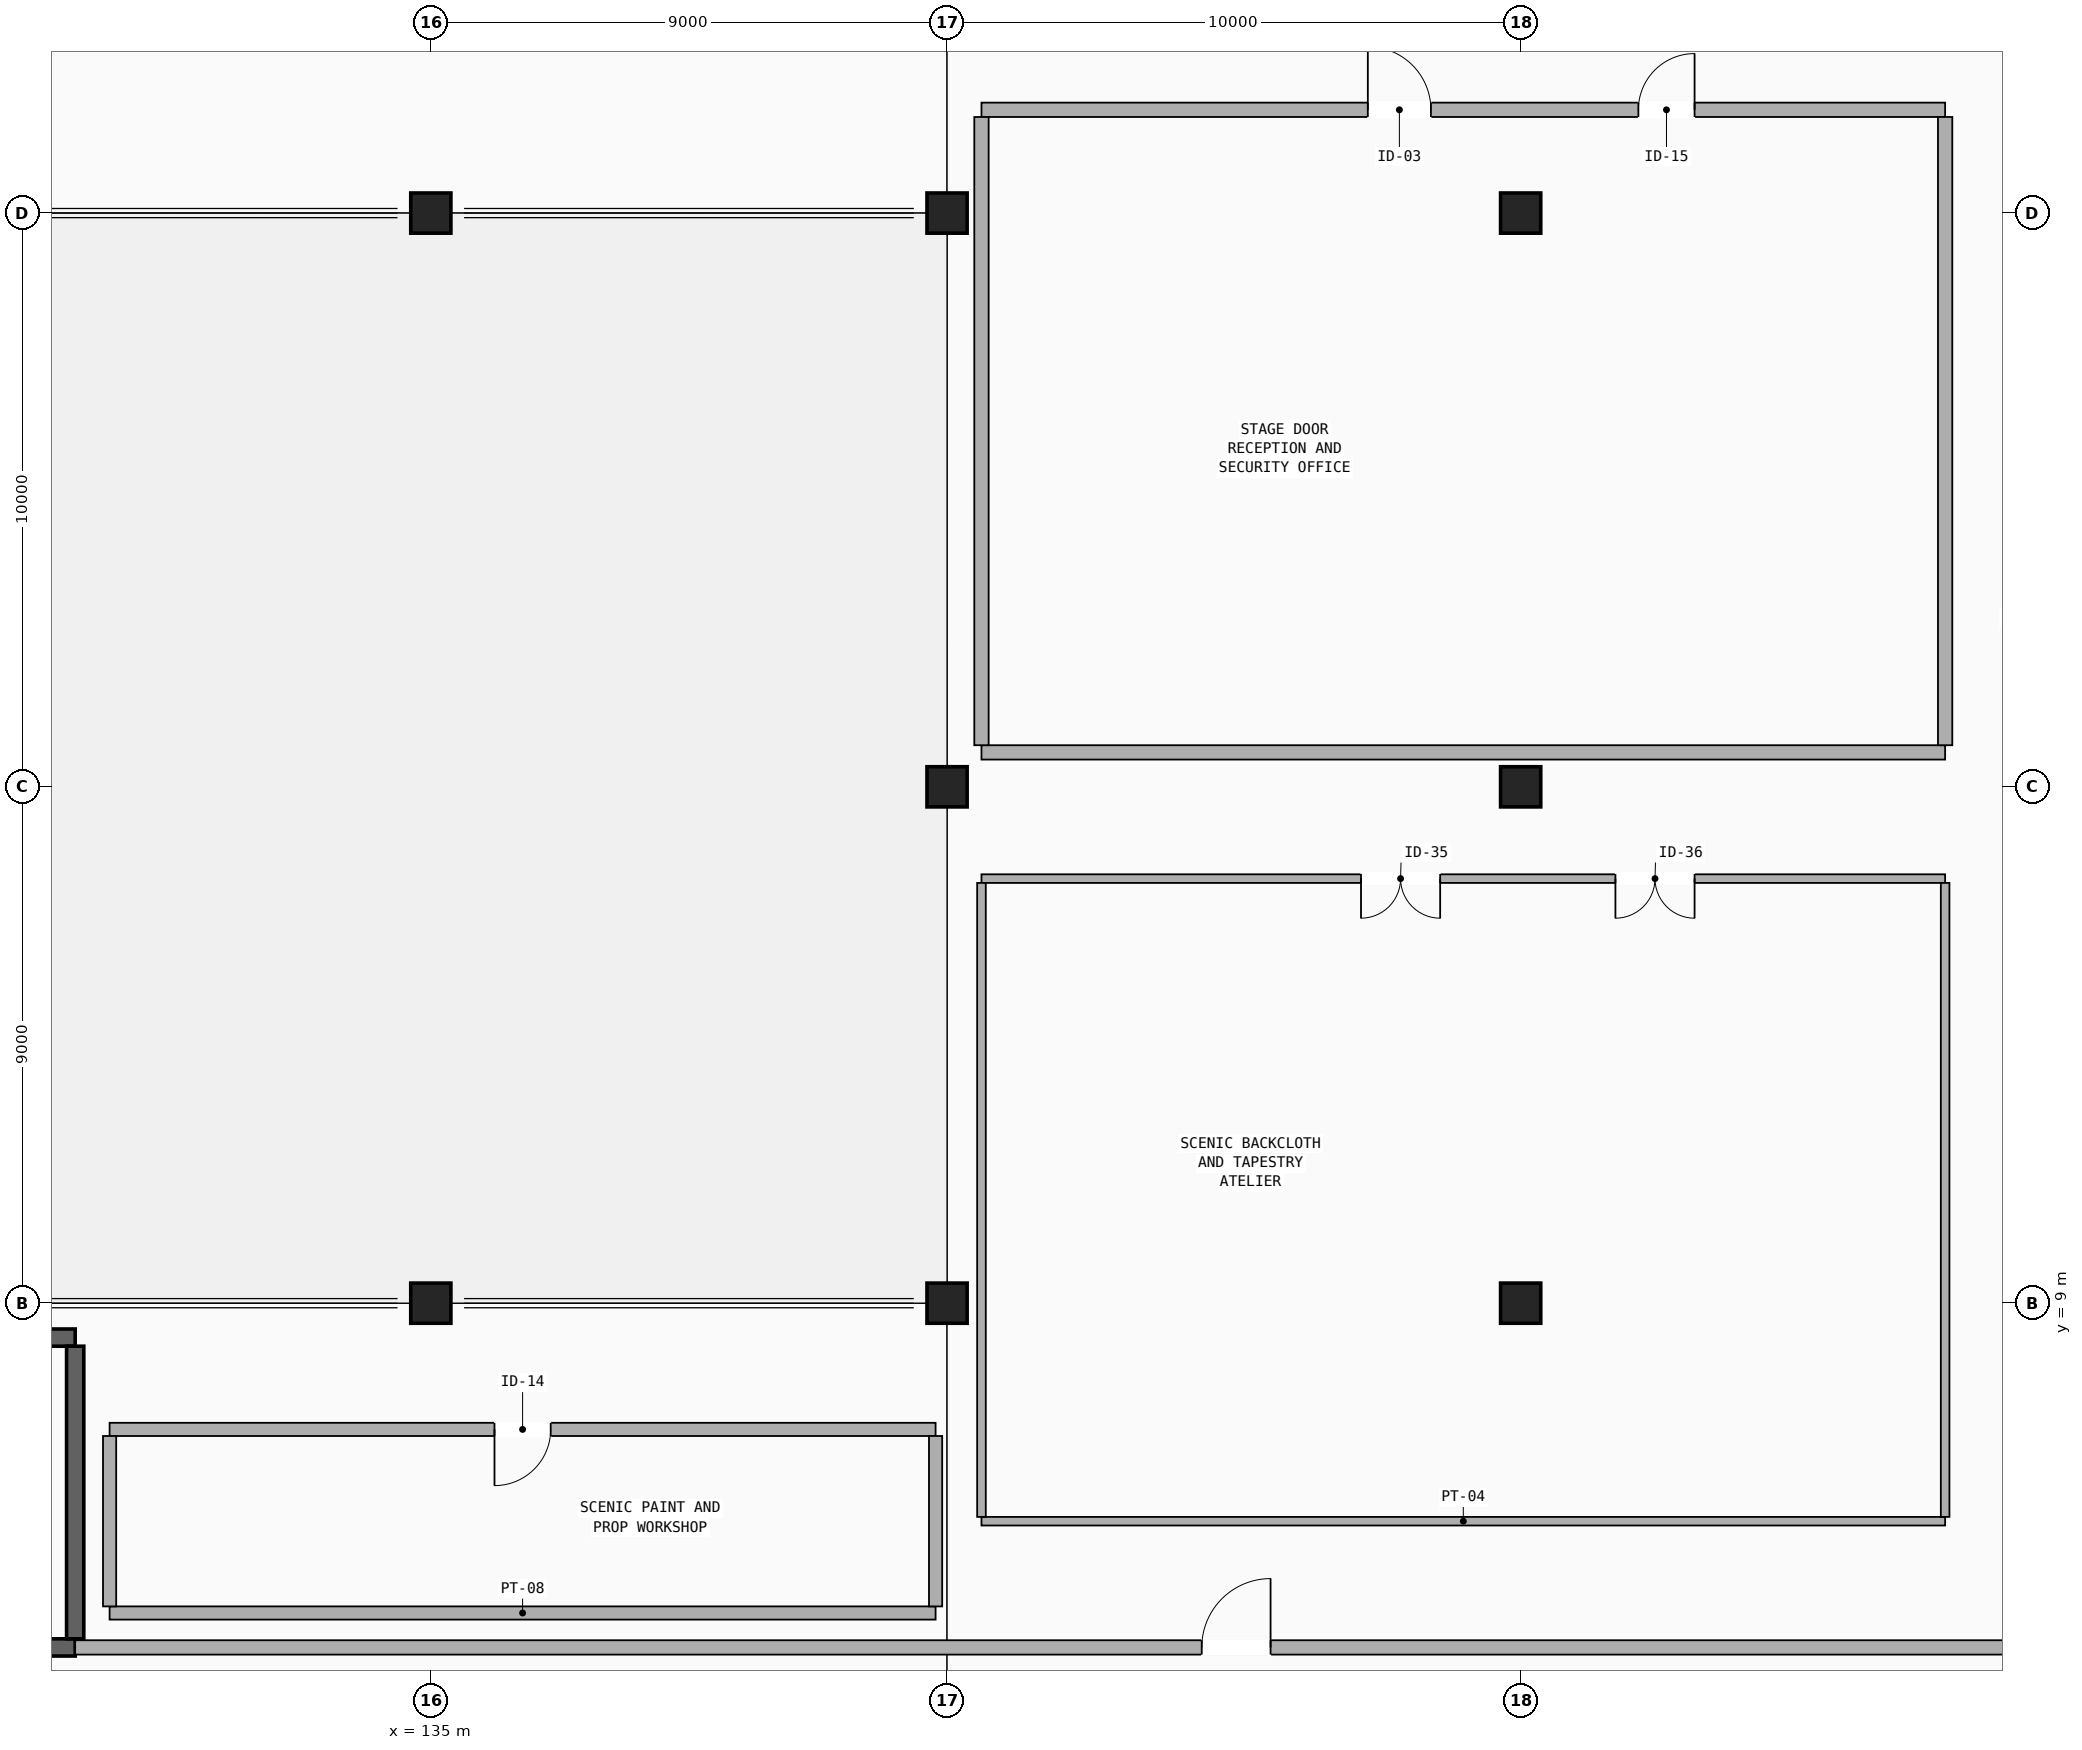
"""IFC4 building model, lengths in metres.
Left out: names, types, materials, properties, quantities, classifications, styles, units other than length and angle.
Written with IfcOpenShell. Run it as: python <this file> out.ifc"""

import sys

from ifc_helpers import new_model, si_unit, direction, frame, frame_2d, origin, origin_2d, place, context, subcontext, project, spatial, rectangle, extrude, element, fill, save


model = new_model("IFC4")
c1 = context("Model", 3, precision=1e-05, world=origin(), true_north=direction((0.0, 1.0)))
c2 = subcontext(c1, "Body", "Model", "MODEL_VIEW")
j1 = project(units=[si_unit("LENGTHUNIT", "METRE"), si_unit("PLANEANGLEUNIT", "RADIAN")], contexts=[c1])
p1 = place(None, origin())
s1 = spatial("IfcSite", under=j1, at=p1, CompositionType="ELEMENT")
p2 = place(p1, origin())
s2 = spatial("IfcBuilding", under=s1, at=p2, CompositionType="ELEMENT")
p3 = place(p2, origin())
s3 = spatial("IfcBuildingStorey", under=s2, at=p3, CompositionType="ELEMENT", Elevation=0.0)
for number, where, z_axis, x_axis in (
    (1, (135.0, 9.0, 0.0), (0.0, 0.0, 1.0), (1.0, 0.0, 0.0)),
    (2, (135.0, 28.0, 0.0), (0.0, 0.0, 1.0), (1.0, 0.0, 0.0)),
    (3, (144.0, 9.0, 0.0), (0.0, 0.0, 1.0), (1.0, 0.0, 0.0)),
    (4, (144.0, 18.0, 0.0), (0.0, 0.0, 1.0), (1.0, 0.0, 0.0)),
    (5, (144.0, 28.0, 0.0), (0.0, 0.0, 1.0), (1.0, 0.0, 0.0)),
    (6, (154.0, 9.0, 0.0), (0.0, 0.0, 1.0), (1.0, 0.0, 0.0)),
    (7, (154.0, 18.0, 0.0), (0.0, 0.0, 1.0), (1.0, 0.0, 0.0)),
    (8, (154.0, 28.0, 0.0), (0.0, 0.0, 1.0), (1.0, 0.0, 0.0)),
):
    element("IfcColumn", number, at=place(p3, frame(where, z_axis=z_axis, x_axis=x_axis)), inside=s3, PredefinedType="COLUMN", context=c2, shape_type="SweptSolid", body=[
        extrude(rectangle(XDim=0.7, YDim=0.7, at=origin_2d()), origin(), (0.0, 0.0, 1.0), 5.1),
    ])
p4 = place(p3, frame((118.5, 3.0, 0.0), z_axis=(0.0, 0.0, 1.0), x_axis=(1.0, 0.0, 0.0)))
e9 = element("IfcWall", 9, at=p4, inside=s3, PredefinedType="SHEAR", context=c2, shape_type="SweptSolid", body=[
    extrude(rectangle(XDim=10.3, YDim=0.3, at=frame_2d((5.15, 0.0))), origin(), (0.0, 0.0, 1.0), 5.1),
])
p5 = place(p4, frame((0.45, 0.0, 0.0)))
e10 = element("IfcOpeningElement", 10, at=p5, cuts=e9, PredefinedType="OPENING", context=c2, shape_type="SweptSolid", body=[
    extrude(rectangle(XDim=1.1, YDim=2.2, at=frame_2d((0.55, 1.1))), frame((0.0, 0.16, 0.0), z_axis=(0.0, -1.0, 0.0), x_axis=(1.0, 0.0, 0.0)), (0.0, 0.0, 1.0), 0.32),
])
p6 = place(p3, frame((118.5, 8.4, 0.0), z_axis=(0.0, 0.0, 1.0), x_axis=(1.0, 0.0, 0.0)))
e11 = element("IfcWall", 11, at=p6, inside=s3, PredefinedType="SHEAR", context=c2, shape_type="SweptSolid", body=[
    extrude(rectangle(XDim=10.3, YDim=0.3, at=frame_2d((5.15, 0.0))), origin(), (0.0, 0.0, 1.0), 5.1),
])
p7 = place(p3, frame((128.8, 3.15, 0.0), z_axis=(0.0, 0.0, 1.0), x_axis=(0.0, 1.0, 0.0)))
e12 = element("IfcWall", 12, at=p7, inside=s3, PredefinedType="SHEAR", context=c2, shape_type="SweptSolid", body=[
    extrude(rectangle(XDim=5.1, YDim=0.3, at=frame_2d((2.55, 0.0))), origin(), (0.0, 0.0, 1.0), 5.1),
])
p8 = place(p3, frame((129.4, 3.6, 0.0), z_axis=(0.0, 0.0, 1.0), x_axis=(1.0, 0.0, 0.0)))
e13 = element("IfcWall", 13, at=p8, inside=s3, PredefinedType="PARTITIONING", context=c2, shape_type="SweptSolid", body=[
    extrude(rectangle(XDim=14.4, YDim=0.23, at=frame_2d((7.2, 0.0))), origin(), (0.0, 0.0, 1.0), 4.15),
])
p9 = place(p3, frame((129.4, 6.8, 0.0), z_axis=(0.0, 0.0, 1.0), x_axis=(1.0, 0.0, 0.0)))
e14 = element("IfcWall", 14, at=p9, inside=s3, PredefinedType="PARTITIONING", context=c2, shape_type="SweptSolid", body=[
    extrude(rectangle(XDim=14.4, YDim=0.23, at=frame_2d((7.2, 0.0))), origin(), (0.0, 0.0, 1.0), 4.15),
])
p10 = place(p9, frame((6.71, 0.0, 0.0)))
e15 = element("IfcOpeningElement", 15, at=p10, cuts=e14, PredefinedType="OPENING", context=c2, shape_type="SweptSolid", body=[
    extrude(rectangle(XDim=0.98, YDim=2.14, at=frame_2d((0.49, 1.07))), frame((0.0, 0.125, 0.0), z_axis=(0.0, -1.0, 0.0), x_axis=(1.0, 0.0, 0.0)), (0.0, 0.0, 1.0), 0.25),
])
p11 = place(p3, frame((129.4, 3.715, 0.0), z_axis=(0.0, 0.0, 1.0), x_axis=(0.0, 1.0, 0.0)))
e16 = element("IfcWall", 16, at=p11, inside=s3, PredefinedType="PARTITIONING", context=c2, shape_type="SweptSolid", body=[
    extrude(rectangle(XDim=2.97, YDim=0.23, at=frame_2d((1.485, 0.0))), origin(), (0.0, 0.0, 1.0), 4.85),
])
p12 = place(p3, frame((143.8, 3.715, 0.0), z_axis=(0.0, 0.0, 1.0), x_axis=(0.0, 1.0, 0.0)))
e17 = element("IfcWall", 17, at=p12, inside=s3, PredefinedType="PARTITIONING", context=c2, shape_type="SweptSolid", body=[
    extrude(rectangle(XDim=2.97, YDim=0.23, at=frame_2d((1.485, 0.0))), origin(), (0.0, 0.0, 1.0), 4.15),
])
p13 = place(p3, frame((144.6, 18.6, 0.0), z_axis=(0.0, 0.0, 1.0), x_axis=(1.0, 0.0, 0.0)))
e18 = element("IfcWall", 18, at=p13, inside=s3, PredefinedType="PARTITIONING", context=c2, shape_type="SweptSolid", body=[
    extrude(rectangle(XDim=16.8, YDim=0.25, at=frame_2d((8.4, 0.0))), origin(), (0.0, 0.0, 1.0), 3.98),
])
p14 = place(p3, frame((144.6, 29.8, 0.0), z_axis=(0.0, 0.0, 1.0), x_axis=(1.0, 0.0, 0.0)))
e19 = element("IfcWall", 19, at=p14, inside=s3, PredefinedType="PARTITIONING", context=c2, shape_type="SweptSolid", body=[
    extrude(rectangle(XDim=16.8, YDim=0.25, at=frame_2d((8.4, 0.0))), origin(), (0.0, 0.0, 1.0), 4.13),
])
p15 = place(p14, frame((6.736, 0.0, 0.0)))
e20 = element("IfcOpeningElement", 20, at=p15, cuts=e19, PredefinedType="OPENING", context=c2, shape_type="SweptSolid", body=[
    extrude(rectangle(XDim=1.1, YDim=2.2, at=frame_2d((0.55, 1.1))), frame((0.0, 0.135, 0.0), z_axis=(0.0, -1.0, 0.0), x_axis=(1.0, 0.0, 0.0)), (0.0, 0.0, 1.0), 0.27),
])
p16 = place(p14, frame((11.452, 0.0, 0.0)))
e21 = element("IfcOpeningElement", 21, at=p16, cuts=e19, PredefinedType="OPENING", context=c2, shape_type="SweptSolid", body=[
    extrude(rectangle(XDim=0.98, YDim=2.22, at=frame_2d((0.49, 1.11))), frame((0.0, 0.135, 0.0), z_axis=(0.0, -1.0, 0.0), x_axis=(1.0, 0.0, 0.0)), (0.0, 0.0, 1.0), 0.27),
])
p17 = place(p3, frame((144.6, 18.725, 0.0), z_axis=(0.0, 0.0, 1.0), x_axis=(0.0, 1.0, 0.0)))
e22 = element("IfcWall", 22, at=p17, inside=s3, PredefinedType="PARTITIONING", context=c2, shape_type="SweptSolid", body=[
    extrude(rectangle(XDim=10.95, YDim=0.25, at=frame_2d((5.475, 0.0))), origin(), (0.0, 0.0, 1.0), 3.98),
])
p18 = place(p3, frame((161.4, 18.725, 0.0), z_axis=(0.0, 0.0, 1.0), x_axis=(0.0, 1.0, 0.0)))
e23 = element("IfcWall", 23, at=p18, inside=s3, PredefinedType="PARTITIONING", context=c2, shape_type="SweptSolid", body=[
    extrude(rectangle(XDim=10.95, YDim=0.25, at=frame_2d((5.475, 0.0))), origin(), (0.0, 0.0, 1.0), 3.93),
])
p19 = place(p3, frame((144.6, 5.2, 0.0), z_axis=(0.0, 0.0, 1.0), x_axis=(1.0, 0.0, 0.0)))
e24 = element("IfcWall", 24, at=p19, inside=s3, PredefinedType="PARTITIONING", context=c2, shape_type="SweptSolid", body=[
    extrude(rectangle(XDim=16.8, YDim=0.15, at=frame_2d((8.4, 0.0))), origin(), (0.0, 0.0, 1.0), 4.15),
])
p20 = place(p3, frame((144.6, 16.4, 0.0), z_axis=(0.0, 0.0, 1.0), x_axis=(1.0, 0.0, 0.0)))
e25 = element("IfcWall", 25, at=p20, inside=s3, PredefinedType="PARTITIONING", context=c2, shape_type="SweptSolid", body=[
    extrude(rectangle(XDim=16.8, YDim=0.15, at=frame_2d((8.4, 0.0))), origin(), (0.0, 0.0, 1.0), 4.18),
])
p21 = place(p20, frame((6.616, 0.0, 0.0)))
e26 = element("IfcOpeningElement", 26, at=p21, cuts=e25, PredefinedType="OPENING", context=c2, shape_type="SweptSolid", body=[
    extrude(rectangle(XDim=1.38, YDim=2.14, at=frame_2d((0.69, 1.07))), frame((0.0, 0.085, 0.0), z_axis=(0.0, -1.0, 0.0), x_axis=(1.0, 0.0, 0.0)), (0.0, 0.0, 1.0), 0.17),
])
p22 = place(p20, frame((11.052, 0.0, 0.0)))
e27 = element("IfcOpeningElement", 27, at=p22, cuts=e25, PredefinedType="OPENING", context=c2, shape_type="SweptSolid", body=[
    extrude(rectangle(XDim=1.38, YDim=2.22, at=frame_2d((0.69, 1.11))), frame((0.0, 0.085, 0.0), z_axis=(0.0, -1.0, 0.0), x_axis=(1.0, 0.0, 0.0)), (0.0, 0.0, 1.0), 0.17),
])
p23 = place(p3, frame((144.6, 5.275, 0.0), z_axis=(0.0, 0.0, 1.0), x_axis=(0.0, 1.0, 0.0)))
e28 = element("IfcWall", 28, at=p23, inside=s3, PredefinedType="PARTITIONING", context=c2, shape_type="SweptSolid", body=[
    extrude(rectangle(XDim=11.05, YDim=0.15, at=frame_2d((5.525, 0.0))), origin(), (0.0, 0.0, 1.0), 4.08),
])
p24 = place(p3, frame((161.4, 5.275, 0.0), z_axis=(0.0, 0.0, 1.0), x_axis=(0.0, 1.0, 0.0)))
e29 = element("IfcWall", 29, at=p24, inside=s3, PredefinedType="PARTITIONING", context=c2, shape_type="SweptSolid", body=[
    extrude(rectangle(XDim=11.05, YDim=0.15, at=frame_2d((5.525, 0.0))), origin(), (0.0, 0.0, 1.0), 3.83),
])
p25 = place(p3, frame((163.64, 3.0, 0.0), z_axis=(0.0, 0.0, 1.0), x_axis=(-1.0, 0.0, 0.0)))
e30 = element("IfcWall", 30, at=p25, inside=s3, PredefinedType="PARTITIONING", context=c2, shape_type="SweptSolid", body=[
    extrude(rectangle(XDim=34.84, YDim=0.25, at=frame_2d((17.42, 0.0))), origin(), (0.0, 0.0, 1.0), 4.15),
])
p26 = place(p25, frame((14.0, 0.0, 0.0)))
e31 = element("IfcOpeningElement", 31, at=p26, cuts=e30, PredefinedType="OPENING", context=c2, shape_type="SweptSolid", body=[
    extrude(rectangle(XDim=1.2, YDim=2.2, at=frame_2d((0.6, 1.1))), frame((0.0, 0.135, 0.0), z_axis=(0.0, -1.0, 0.0), x_axis=(1.0, 0.0, 0.0)), (0.0, 0.0, 1.0), 0.27),
])
p27 = place(p10, frame((0.98, 0.0, 0.0), z_axis=(0.0, 0.0, 1.0), x_axis=(-1.0, 0.0, 0.0)))
e32 = element("IfcDoor", 32, at=p27, inside=s3, OperationType="SINGLE_SWING_RIGHT", PredefinedType="DOOR", context=c2, shape_type="SweptSolid", body=[
    extrude(rectangle(XDim=0.98, YDim=2.14, at=frame_2d((0.49, 1.07))), frame((0.0, 0.025, 0.0), z_axis=(0.0, -1.0, 0.0), x_axis=(1.0, 0.0, 0.0)), (0.0, 0.0, 1.0), 0.05),
])
fill(e15, e32)
p28 = place(p15, origin())
e33 = element("IfcDoor", 33, at=p28, inside=s3, OperationType="SINGLE_SWING_LEFT", PredefinedType="DOOR", context=c2, shape_type="SweptSolid", body=[
    extrude(rectangle(XDim=1.1, YDim=2.2, at=frame_2d((0.55, 1.1))), frame((0.0, 0.025, 0.0), z_axis=(0.0, -1.0, 0.0), x_axis=(1.0, 0.0, 0.0)), (0.0, 0.0, 1.0), 0.05),
])
fill(e20, e33)
p29 = place(p16, origin())
e34 = element("IfcDoor", 34, at=p29, inside=s3, OperationType="SINGLE_SWING_RIGHT", PredefinedType="DOOR", context=c2, shape_type="SweptSolid", body=[
    extrude(rectangle(XDim=0.98, YDim=2.22, at=frame_2d((0.49, 1.11))), frame((0.0, 0.025, 0.0), z_axis=(0.0, -1.0, 0.0), x_axis=(1.0, 0.0, 0.0)), (0.0, 0.0, 1.0), 0.05),
])
fill(e21, e34)
p30 = place(p21, frame((1.38, 0.0, 0.0), z_axis=(0.0, 0.0, 1.0), x_axis=(-1.0, 0.0, 0.0)))
e35 = element("IfcDoor", 35, at=p30, inside=s3, OperationType="DOUBLE_DOOR_SINGLE_SWING", PredefinedType="DOOR", context=c2, shape_type="SweptSolid", body=[
    extrude(rectangle(XDim=1.38, YDim=2.14, at=frame_2d((0.69, 1.07))), frame((0.0, 0.025, 0.0), z_axis=(0.0, -1.0, 0.0), x_axis=(1.0, 0.0, 0.0)), (0.0, 0.0, 1.0), 0.05),
])
fill(e26, e35)
p31 = place(p22, frame((1.38, 0.0, 0.0), z_axis=(0.0, 0.0, 1.0), x_axis=(-1.0, 0.0, 0.0)))
e36 = element("IfcDoor", 36, at=p31, inside=s3, OperationType="DOUBLE_DOOR_SINGLE_SWING", PredefinedType="DOOR", context=c2, shape_type="SweptSolid", body=[
    extrude(rectangle(XDim=1.38, YDim=2.22, at=frame_2d((0.69, 1.11))), frame((0.0, 0.025, 0.0), z_axis=(0.0, -1.0, 0.0), x_axis=(1.0, 0.0, 0.0)), (0.0, 0.0, 1.0), 0.05),
])
fill(e27, e36)
p32 = place(p26, frame((1.2, 0.0, 0.0), z_axis=(0.0, 0.0, 1.0), x_axis=(-1.0, 0.0, 0.0)))
e37 = element("IfcDoor", 37, at=p32, inside=s3, OperationType="SINGLE_SWING_RIGHT", PredefinedType="DOOR", context=c2, shape_type="SweptSolid", body=[
    extrude(rectangle(XDim=1.2, YDim=2.2, at=frame_2d((0.6, 1.1))), frame((0.0, 0.025, 0.0), z_axis=(0.0, -1.0, 0.0), x_axis=(1.0, 0.0, 0.0)), (0.0, 0.0, 1.0), 0.05),
])
fill(e31, e37)
save(model, sys.argv[1])
